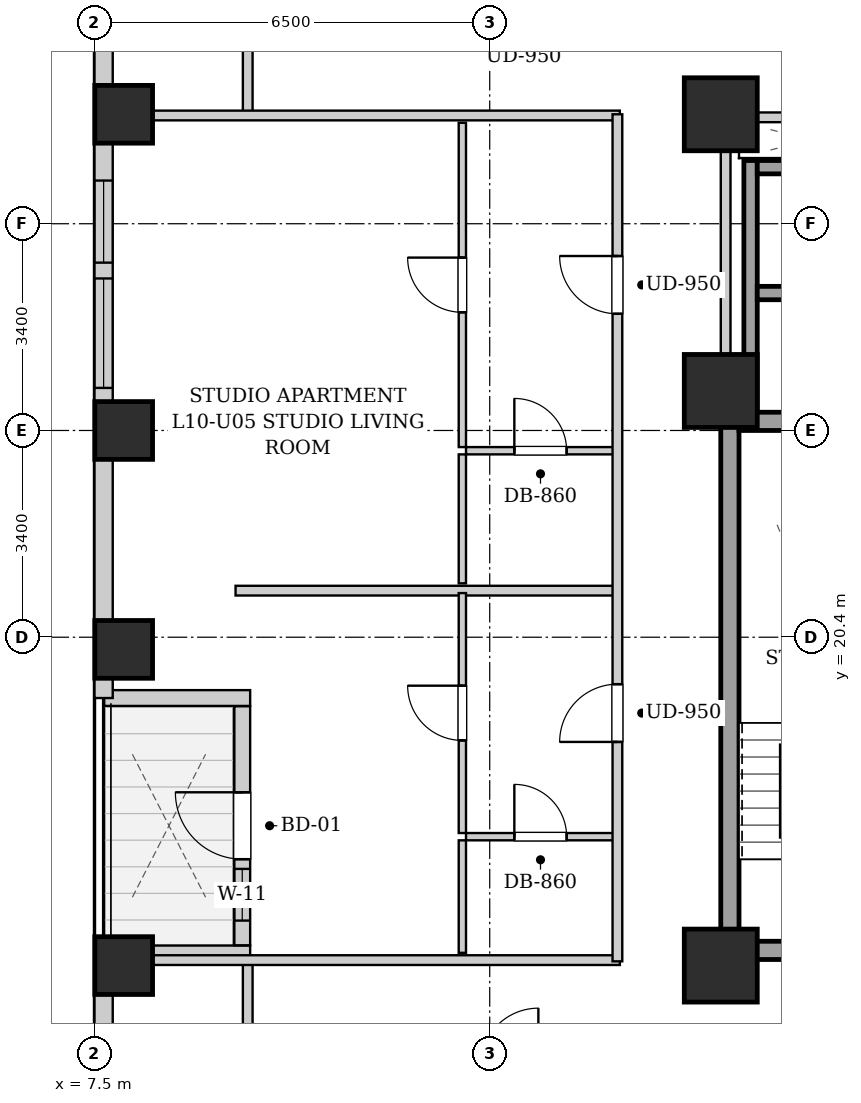
"""IFC4 building model, lengths in metres.
Left out: names, types, materials, properties, quantities, classifications, styles, units other than length and angle.
Written with IfcOpenShell. Run it as: python <this file> out.ifc"""

import sys

from ifc_helpers import new_model, si_unit, direction, frame, frame_2d, origin, origin_2d, place, context, subcontext, project, spatial, rectangle, extrude, element, fill, save


model = new_model("IFC4")
c1 = context("Model", 3, precision=1e-05, world=origin(), true_north=direction((0.0, 1.0)))
c2 = subcontext(c1, "Body", "Model", "MODEL_VIEW")
j1 = project(units=[si_unit("LENGTHUNIT", "METRE"), si_unit("PLANEANGLEUNIT", "RADIAN")], contexts=[c1])
p1 = place(None, origin())
s1 = spatial("IfcSite", under=j1, at=p1, CompositionType="ELEMENT")
p2 = place(p1, origin())
s2 = spatial("IfcBuilding", under=s1, at=p2, CompositionType="ELEMENT")
p3 = place(p2, frame((0.0, 0.0, 41.8)))
s3 = spatial("IfcBuildingStorey", under=s2, at=p3, CompositionType="ELEMENT", Elevation=41.8)
for number, where, z_axis, x_axis in (
    (1, (7.98, 15.0, 0.0), (0.0, 0.0, 1.0), (1.0, 0.0, 0.0)),
    (2, (7.98, 20.2, 0.0), (0.0, 0.0, 1.0), (1.0, 0.0, 0.0)),
    (3, (7.98, 23.8, 0.0), (0.0, 0.0, 1.0), (1.0, 0.0, 0.0)),
    (4, (7.98, 29.0, 0.0), (0.0, 0.0, 1.0), (1.0, 0.0, 0.0)),
):
    element("IfcColumn", number, at=place(p3, frame(where, z_axis=z_axis, x_axis=x_axis)), inside=s3, PredefinedType="COLUMN", context=c2, shape_type="SweptSolid", body=[
        extrude(rectangle(XDim=0.95, YDim=0.95, at=origin_2d()), origin(), (0.0, 0.0, 1.0), 3.2),
    ])
for number, where, z_axis, x_axis in (
    (5, (17.8, 15.0, 0.0), (0.0, 0.0, 1.0), (1.0, 0.0, 0.0)),
    (6, (17.8, 29.0, 0.0), (0.0, 0.0, 1.0), (1.0, 0.0, 0.0)),
    (7, (17.8, 24.45, 0.0), (0.0, 0.0, 1.0), (1.0, 0.0, 0.0)),
):
    element("IfcColumn", number, at=place(p3, frame(where, z_axis=z_axis, x_axis=x_axis)), inside=s3, PredefinedType="COLUMN", context=c2, shape_type="SweptSolid", body=[
        extrude(rectangle(XDim=1.2, YDim=1.2, at=origin_2d()), origin(), (0.0, 0.0, 1.0), 3.2),
    ])
p4 = place(p3, frame((7.65, 2.5, 0.0), z_axis=(0.0, 0.0, 1.0), x_axis=(0.0, 1.0, 0.0)))
e8 = element("IfcWall", 8, at=p4, inside=s3, PredefinedType="SOLIDWALL", context=c2, shape_type="SweptSolid", body=[
    extrude(rectangle(XDim=12.7, YDim=0.3, at=frame_2d((6.35, 0.0))), origin(), (0.0, 0.0, 1.0), 1.975),
])
p5 = place(p4, frame((3.257, 0.0, 0.55)))
e9 = element("IfcOpeningElement", 9, at=p5, cuts=e8, PredefinedType="OPENING", context=c2, shape_type="SweptSolid", body=[
    extrude(rectangle(XDim=1.8, YDim=1.2, at=frame_2d((0.9, 0.6))), frame((0.0, 0.16, 0.0), z_axis=(0.0, -1.0, 0.0), x_axis=(1.0, 0.0, 0.0)), (0.0, 0.0, 1.0), 0.32),
])
p6 = place(p4, frame((1.185, 0.0, 0.55)))
e10 = element("IfcOpeningElement", 10, at=p6, cuts=e8, PredefinedType="OPENING", context=c2, shape_type="SweptSolid", body=[
    extrude(rectangle(XDim=1.35, YDim=1.2, at=frame_2d((0.675, 0.6))), frame((0.0, 0.16, 0.0), z_axis=(0.0, -1.0, 0.0), x_axis=(1.0, 0.0, 0.0)), (0.0, 0.0, 1.0), 0.32),
])
p7 = place(p3, frame((7.66, 15.2, 0.0), z_axis=(0.0, 0.0, 1.0), x_axis=(1.0, 0.0, 0.0)))
e11 = element("IfcWall", 11, at=p7, inside=s3, PredefinedType="SOLIDWALL", context=c2, shape_type="SweptSolid", body=[
    extrude(rectangle(XDim=2.4, YDim=0.26, at=frame_2d((1.2, 0.0))), origin(), (0.0, 0.0, 1.0), 2.94),
])
p8 = place(p3, frame((9.93, 15.334, 0.0), z_axis=(0.0, 0.0, 1.0), x_axis=(0.0, 1.0, 0.0)))
e12 = element("IfcWall", 12, at=p8, inside=s3, PredefinedType="SOLIDWALL", context=c2, shape_type="SweptSolid", body=[
    extrude(rectangle(XDim=3.932, YDim=0.26, at=frame_2d((1.966, 0.0))), origin(), (0.0, 0.0, 1.0), 2.94),
])
p9 = place(p8, frame((1.416, 0.0, 0.0)))
e13 = element("IfcOpeningElement", 13, at=p9, cuts=e12, PredefinedType="OPENING", context=c2, shape_type="SweptSolid", body=[
    extrude(rectangle(XDim=1.1, YDim=2.0, at=frame_2d((0.55, 1.0))), frame((0.0, 0.14, 0.0), z_axis=(0.0, -1.0, 0.0), x_axis=(1.0, 0.0, 0.0)), (0.0, 0.0, 1.0), 0.28),
])
p10 = place(p8, frame((0.406, 0.0, 0.55)))
e14 = element("IfcOpeningElement", 14, at=p10, cuts=e12, PredefinedType="OPENING", context=c2, shape_type="SweptSolid", body=[
    extrude(rectangle(XDim=0.85, YDim=1.2, at=frame_2d((0.425, 0.6))), frame((0.0, 0.14, 0.0), z_axis=(0.0, -1.0, 0.0), x_axis=(1.0, 0.0, 0.0)), (0.0, 0.0, 1.0), 0.28),
])
p11 = place(p3, frame((10.06, 19.4, 0.0), z_axis=(0.0, 0.0, 1.0), x_axis=(-1.0, 0.0, 0.0)))
e15 = element("IfcWall", 15, at=p11, inside=s3, PredefinedType="SOLIDWALL", context=c2, shape_type="SweptSolid", body=[
    extrude(rectangle(XDim=2.4, YDim=0.26, at=frame_2d((1.2, 0.0))), origin(), (0.0, 0.0, 1.0), 2.94),
])
p12 = place(p3, frame((7.65, 19.4, 0.0), z_axis=(0.0, 0.0, 1.0), x_axis=(0.0, 1.0, 0.0)))
e16 = element("IfcWall", 16, at=p12, inside=s3, PredefinedType="SOLIDWALL", context=c2, shape_type="SweptSolid", body=[
    extrude(rectangle(XDim=25.7, YDim=0.3, at=frame_2d((12.85, 0.0))), origin(), (0.0, 0.0, 1.0), 1.975),
])
p13 = place(p12, frame((20.235, 0.0, 0.55)))
e17 = element("IfcOpeningElement", 17, at=p13, cuts=e16, PredefinedType="OPENING", context=c2, shape_type="SweptSolid", body=[
    extrude(rectangle(XDim=1.8, YDim=1.2, at=frame_2d((0.9, 0.6))), frame((0.0, 0.16, 0.0), z_axis=(0.0, -1.0, 0.0), x_axis=(1.0, 0.0, 0.0)), (0.0, 0.0, 1.0), 0.32),
])
p14 = place(p12, frame((14.635, 0.0, 0.55)))
e18 = element("IfcOpeningElement", 18, at=p14, cuts=e16, PredefinedType="OPENING", context=c2, shape_type="SweptSolid", body=[
    extrude(rectangle(XDim=1.35, YDim=1.2, at=frame_2d((0.675, 0.6))), frame((0.0, 0.16, 0.0), z_axis=(0.0, -1.0, 0.0), x_axis=(1.0, 0.0, 0.0)), (0.0, 0.0, 1.0), 0.32),
])
p15 = place(p12, frame((5.1, 0.0, 0.55)))
e19 = element("IfcOpeningElement", 19, at=p15, cuts=e16, PredefinedType="OPENING", context=c2, shape_type="SweptSolid", body=[
    extrude(rectangle(XDim=1.8, YDim=1.2, at=frame_2d((0.9, 0.6))), frame((0.0, 0.16, 0.0), z_axis=(0.0, -1.0, 0.0), x_axis=(1.0, 0.0, 0.0)), (0.0, 0.0, 1.0), 0.32),
])
p16 = place(p12, frame((7.16, 0.0, 0.55)))
e20 = element("IfcOpeningElement", 20, at=p16, cuts=e16, PredefinedType="OPENING", context=c2, shape_type="SweptSolid", body=[
    extrude(rectangle(XDim=1.35, YDim=1.2, at=frame_2d((0.675, 0.6))), frame((0.0, 0.16, 0.0), z_axis=(0.0, -1.0, 0.0), x_axis=(1.0, 0.0, 0.0)), (0.0, 0.0, 1.0), 0.32),
])
p17 = place(p3, frame((17.95, 15.1, 0.0), z_axis=(0.0, 0.0, 1.0), x_axis=(0.0, 1.0, 0.0)))
e21 = element("IfcWall", 21, at=p17, inside=s3, PredefinedType="SHEAR", context=c2, shape_type="SweptSolid", body=[
    extrude(rectangle(XDim=9.0, YDim=0.3, at=frame_2d((4.5, 0.0))), origin(), (0.0, 0.0, 1.0), 2.94),
])
p18 = place(p3, frame((18.1, 23.95, 0.0), z_axis=(0.0, 0.0, 1.0), x_axis=(1.0, 0.0, 0.0)))
e22 = element("IfcWall", 22, at=p18, inside=s3, PredefinedType="SHEAR", context=c2, shape_type="SweptSolid", body=[
    extrude(rectangle(XDim=2.85, YDim=0.3, at=frame_2d((1.425, 0.0))), origin(), (0.0, 0.0, 1.0), 2.94),
])
p19 = place(p3, frame((18.1, 15.25, 0.0), z_axis=(0.0, 0.0, 1.0), x_axis=(1.0, 0.0, 0.0)))
e23 = element("IfcWall", 23, at=p19, inside=s3, PredefinedType="SHEAR", context=c2, shape_type="SweptSolid", body=[
    extrude(rectangle(XDim=2.85, YDim=0.3, at=frame_2d((1.425, 0.0))), origin(), (0.0, 0.0, 1.0), 2.94),
])
p20 = place(p19, frame((0.86, 0.0, 0.0)))
e24 = element("IfcOpeningElement", 24, at=p20, cuts=e23, PredefinedType="OPENING", context=c2, shape_type="SweptSolid", body=[
    extrude(rectangle(XDim=1.1, YDim=2.05, at=frame_2d((0.55, 1.025))), frame((0.0, 0.16, 0.0), z_axis=(0.0, -1.0, 0.0), x_axis=(1.0, 0.0, 0.0)), (0.0, 0.0, 1.0), 0.32),
])
p21 = place(p3, frame((18.29, 24.1, 0.0), z_axis=(0.0, 0.0, 1.0), x_axis=(0.0, 1.0, 0.0)))
e25 = element("IfcWall", 25, at=p21, inside=s3, PredefinedType="SHEAR", context=c2, shape_type="SweptSolid", body=[
    extrude(rectangle(XDim=4.14, YDim=0.22, at=frame_2d((2.07, 0.0))), origin(), (0.0, 0.0, 1.0), 2.94),
])
for number, where, z_axis, x_axis in (
    (26, (18.4, 26.06, 0.0), (0.0, 0.0, 1.0), (1.0, 0.0, 0.0)),
    (27, (18.4, 28.13, 0.0), (0.0, 0.0, 1.0), (1.0, 0.0, 0.0)),
):
    element("IfcWall", number, at=place(p3, frame(where, z_axis=z_axis, x_axis=x_axis)), inside=s3, PredefinedType="SHEAR", context=c2, shape_type="SweptSolid", body=[
        extrude(rectangle(XDim=1.9, YDim=0.22, at=frame_2d((0.95, 0.0))), origin(), (0.0, 0.0, 1.0), 2.94),
    ])
p22 = place(p3, frame((17.88, 24.12, 0.0), z_axis=(0.0, 0.0, 1.0), x_axis=(0.0, 1.0, 0.0)))
e28 = element("IfcWall", 28, at=p22, inside=s3, PredefinedType="PARTITIONING", context=c2, shape_type="SweptSolid", body=[
    extrude(rectangle(XDim=4.76, YDim=0.16, at=frame_2d((2.38, 0.0))), origin(), (0.0, 0.0, 1.0), 2.94),
])
p23 = place(p3, frame((17.96, 28.95, 0.0), z_axis=(0.0, 0.0, 1.0), x_axis=(1.0, 0.0, 0.0)))
e29 = element("IfcWall", 29, at=p23, inside=s3, PredefinedType="PARTITIONING", context=c2, shape_type="SweptSolid", body=[
    extrude(rectangle(XDim=4.29, YDim=0.16, at=frame_2d((2.145, 0.0))), origin(), (0.0, 0.0, 1.0), 2.155),
])
p24 = place(p23, frame((1.57, 0.0, 0.0)))
e30 = element("IfcOpeningElement", 30, at=p24, cuts=e29, PredefinedType="OPENING", context=c2, shape_type="SweptSolid", body=[
    extrude(rectangle(XDim=0.86, YDim=2.05, at=frame_2d((0.43, 1.025))), frame((0.0, 0.09, 0.0), z_axis=(0.0, -1.0, 0.0), x_axis=(1.0, 0.0, 0.0)), (0.0, 0.0, 1.0), 0.18),
])
for number, where, z_axis, x_axis in (
    (31, (10.02, 13.35, 0.0), (0.0, 0.0, 1.0), (0.0, 1.0, 0.0)),
    (32, (10.02, 28.98, 0.0), (0.0, 0.0, 1.0), (0.0, 1.0, 0.0)),
):
    element("IfcWall", number, at=place(p3, frame(where, z_axis=z_axis, x_axis=x_axis)), inside=s3, PredefinedType="PARTITIONING", context=c2, shape_type="SweptSolid", body=[
        extrude(rectangle(XDim=1.74, YDim=0.16, at=frame_2d((0.87, 0.0))), origin(), (0.0, 0.0, 1.0), 2.94),
    ])
for number, where, z_axis, x_axis in (
    (33, (7.78, 15.09, 0.0), (0.0, 0.0, 1.0), (1.0, 0.0, 0.0)),
    (34, (7.78, 28.98, 0.0), (0.0, 0.0, 1.0), (1.0, 0.0, 0.0)),
):
    element("IfcWall", number, at=place(p3, frame(where, z_axis=z_axis, x_axis=x_axis)), inside=s3, PredefinedType="PARTITIONING", context=c2, shape_type="SweptSolid", body=[
        extrude(rectangle(XDim=8.36, YDim=0.16, at=frame_2d((4.18, 0.0))), origin(), (0.0, 0.0, 1.0), 2.155),
    ])
p25 = place(p3, frame((9.82, 21.166, 0.0), z_axis=(0.0, 0.0, 1.0), x_axis=(1.0, 0.0, 0.0)))
e35 = element("IfcWall", 35, at=p25, inside=s3, PredefinedType="PARTITIONING", context=c2, shape_type="SweptSolid", body=[
    extrude(rectangle(XDim=6.24, YDim=0.16, at=frame_2d((3.12, 0.0))), origin(), (0.0, 0.0, 1.0), 2.94),
])
p26 = place(p3, frame((13.61, 17.12, 0.0), z_axis=(0.0, 0.0, 1.0), x_axis=(1.0, 0.0, 0.0)))
e36 = element("IfcWall", 36, at=p26, inside=s3, PredefinedType="PARTITIONING", context=c2, shape_type="SweptSolid", body=[
    extrude(rectangle(XDim=2.45, YDim=0.12, at=frame_2d((1.225, 0.0))), origin(), (0.0, 0.0, 1.0), 2.94),
])
p27 = place(p26, frame((0.795, 0.0, 0.0)))
e37 = element("IfcOpeningElement", 37, at=p27, cuts=e36, PredefinedType="OPENING", context=c2, shape_type="SweptSolid", body=[
    extrude(rectangle(XDim=0.86, YDim=2.05, at=frame_2d((0.43, 1.025))), frame((0.0, 0.07, 0.0), z_axis=(0.0, -1.0, 0.0), x_axis=(1.0, 0.0, 0.0)), (0.0, 0.0, 1.0), 0.14),
])
p28 = place(p3, frame((13.55, 15.21, 0.0), z_axis=(0.0, 0.0, 1.0), x_axis=(0.0, 1.0, 0.0)))
e38 = element("IfcWall", 38, at=p28, inside=s3, PredefinedType="PARTITIONING", context=c2, shape_type="SweptSolid", body=[
    extrude(rectangle(XDim=1.85, YDim=0.12, at=frame_2d((0.925, 0.0))), origin(), (0.0, 0.0, 1.0), 2.94),
])
p29 = place(p3, frame((13.55, 17.18, 0.0), z_axis=(0.0, 0.0, 1.0), x_axis=(0.0, 1.0, 0.0)))
e39 = element("IfcWall", 39, at=p29, inside=s3, PredefinedType="PARTITIONING", context=c2, shape_type="SweptSolid", body=[
    extrude(rectangle(XDim=3.946, YDim=0.12, at=frame_2d((1.973, 0.0))), origin(), (0.0, 0.0, 1.0), 2.94),
])
p30 = place(p29, frame((1.523, 0.0, 0.0)))
e40 = element("IfcOpeningElement", 40, at=p30, cuts=e39, PredefinedType="OPENING", context=c2, shape_type="SweptSolid", body=[
    extrude(rectangle(XDim=0.9, YDim=2.05, at=frame_2d((0.45, 1.025))), frame((0.0, 0.07, 0.0), z_axis=(0.0, -1.0, 0.0), x_axis=(1.0, 0.0, 0.0)), (0.0, 0.0, 1.0), 0.14),
])
p31 = place(p3, frame((13.61, 23.467, 0.0), z_axis=(0.0, 0.0, 1.0), x_axis=(1.0, 0.0, 0.0)))
e41 = element("IfcWall", 41, at=p31, inside=s3, PredefinedType="PARTITIONING", context=c2, shape_type="SweptSolid", body=[
    extrude(rectangle(XDim=2.45, YDim=0.12, at=frame_2d((1.225, 0.0))), origin(), (0.0, 0.0, 1.0), 2.94),
])
p32 = place(p31, frame((0.795, 0.0, 0.0)))
e42 = element("IfcOpeningElement", 42, at=p32, cuts=e41, PredefinedType="OPENING", context=c2, shape_type="SweptSolid", body=[
    extrude(rectangle(XDim=0.86, YDim=2.05, at=frame_2d((0.43, 1.025))), frame((0.0, 0.07, 0.0), z_axis=(0.0, -1.0, 0.0), x_axis=(1.0, 0.0, 0.0)), (0.0, 0.0, 1.0), 0.14),
])
p33 = place(p3, frame((13.55, 21.286, 0.0), z_axis=(0.0, 0.0, 1.0), x_axis=(0.0, 1.0, 0.0)))
e43 = element("IfcWall", 43, at=p33, inside=s3, PredefinedType="PARTITIONING", context=c2, shape_type="SweptSolid", body=[
    extrude(rectangle(XDim=2.121, YDim=0.12, at=frame_2d((1.061, 0.0))), origin(), (0.0, 0.0, 1.0), 2.94),
])
p34 = place(p3, frame((13.55, 23.527, 0.0), z_axis=(0.0, 0.0, 1.0), x_axis=(0.0, 1.0, 0.0)))
e44 = element("IfcWall", 44, at=p34, inside=s3, PredefinedType="PARTITIONING", context=c2, shape_type="SweptSolid", body=[
    extrude(rectangle(XDim=5.333, YDim=0.12, at=frame_2d((2.667, 0.0))), origin(), (0.0, 0.0, 1.0), 2.94),
])
p35 = place(p34, frame((2.216, 0.0, 0.0)))
e45 = element("IfcOpeningElement", 45, at=p35, cuts=e44, PredefinedType="OPENING", context=c2, shape_type="SweptSolid", body=[
    extrude(rectangle(XDim=0.9, YDim=2.05, at=frame_2d((0.45, 1.025))), frame((0.0, 0.07, 0.0), z_axis=(0.0, -1.0, 0.0), x_axis=(1.0, 0.0, 0.0)), (0.0, 0.0, 1.0), 0.14),
])
p36 = place(p3, frame((16.1, 15.07, 0.0), z_axis=(0.0, 0.0, 1.0), x_axis=(0.0, 1.0, 0.0)))
e46 = element("IfcWall", 46, at=p36, inside=s3, PredefinedType="PARTITIONING", context=c2, shape_type="SweptSolid", body=[
    extrude(rectangle(XDim=13.93, YDim=0.16, at=frame_2d((6.965, 0.0))), origin(), (0.0, 0.0, 1.0), 2.94),
])
p37 = place(p36, frame((3.608, 0.0, 0.0)))
e47 = element("IfcOpeningElement", 47, at=p37, cuts=e46, PredefinedType="OPENING", context=c2, shape_type="SweptSolid", body=[
    extrude(rectangle(XDim=0.95, YDim=2.1, at=frame_2d((0.475, 1.05))), frame((0.0, 0.09, 0.0), z_axis=(0.0, -1.0, 0.0), x_axis=(1.0, 0.0, 0.0)), (0.0, 0.0, 1.0), 0.18),
])
p38 = place(p36, frame((10.649, 0.0, 0.0)))
e48 = element("IfcOpeningElement", 48, at=p38, cuts=e46, PredefinedType="OPENING", context=c2, shape_type="SweptSolid", body=[
    extrude(rectangle(XDim=0.95, YDim=2.1, at=frame_2d((0.475, 1.05))), frame((0.0, 0.09, 0.0), z_axis=(0.0, -1.0, 0.0), x_axis=(1.0, 0.0, 0.0)), (0.0, 0.0, 1.0), 0.18),
])
p39 = place(p27, origin())
e49 = element("IfcDoor", 49, at=p39, inside=s3, OperationType="SINGLE_SWING_LEFT", PredefinedType="DOOR", context=c2, shape_type="SweptSolid", body=[
    extrude(rectangle(XDim=0.86, YDim=2.05, at=frame_2d((0.43, 1.025))), frame((0.0, 0.025, 0.0), z_axis=(0.0, -1.0, 0.0), x_axis=(1.0, 0.0, 0.0)), (0.0, 0.0, 1.0), 0.05),
])
fill(e37, e49)
p40 = place(p30, origin())
e50 = element("IfcDoor", 50, at=p40, inside=s3, OperationType="SINGLE_SWING_RIGHT", PredefinedType="DOOR", context=c2, shape_type="SweptSolid", body=[
    extrude(rectangle(XDim=0.9, YDim=2.05, at=frame_2d((0.45, 1.025))), frame((0.0, 0.025, 0.0), z_axis=(0.0, -1.0, 0.0), x_axis=(1.0, 0.0, 0.0)), (0.0, 0.0, 1.0), 0.05),
])
fill(e40, e50)
p41 = place(p32, origin())
e51 = element("IfcDoor", 51, at=p41, inside=s3, OperationType="SINGLE_SWING_LEFT", PredefinedType="DOOR", context=c2, shape_type="SweptSolid", body=[
    extrude(rectangle(XDim=0.86, YDim=2.05, at=frame_2d((0.43, 1.025))), frame((0.0, 0.025, 0.0), z_axis=(0.0, -1.0, 0.0), x_axis=(1.0, 0.0, 0.0)), (0.0, 0.0, 1.0), 0.05),
])
fill(e42, e51)
p42 = place(p35, origin())
e52 = element("IfcDoor", 52, at=p42, inside=s3, OperationType="SINGLE_SWING_RIGHT", PredefinedType="DOOR", context=c2, shape_type="SweptSolid", body=[
    extrude(rectangle(XDim=0.9, YDim=2.05, at=frame_2d((0.45, 1.025))), frame((0.0, 0.025, 0.0), z_axis=(0.0, -1.0, 0.0), x_axis=(1.0, 0.0, 0.0)), (0.0, 0.0, 1.0), 0.05),
])
fill(e45, e52)
p43 = place(p37, origin())
e53 = element("IfcDoor", 53, at=p43, inside=s3, OperationType="SINGLE_SWING_LEFT", PredefinedType="DOOR", context=c2, shape_type="SweptSolid", body=[
    extrude(rectangle(XDim=0.95, YDim=2.1, at=frame_2d((0.475, 1.05))), frame((0.0, 0.025, 0.0), z_axis=(0.0, -1.0, 0.0), x_axis=(1.0, 0.0, 0.0)), (0.0, 0.0, 1.0), 0.05),
])
fill(e47, e53)
p44 = place(p38, origin())
e54 = element("IfcDoor", 54, at=p44, inside=s3, OperationType="SINGLE_SWING_RIGHT", PredefinedType="DOOR", context=c2, shape_type="SweptSolid", body=[
    extrude(rectangle(XDim=0.95, YDim=2.1, at=frame_2d((0.475, 1.05))), frame((0.0, 0.025, 0.0), z_axis=(0.0, -1.0, 0.0), x_axis=(1.0, 0.0, 0.0)), (0.0, 0.0, 1.0), 0.05),
])
fill(e48, e54)
p45 = place(p9, origin())
e55 = element("IfcDoor", 55, at=p45, inside=s3, OperationType="SINGLE_SWING_RIGHT", PredefinedType="DOOR", context=c2, shape_type="SweptSolid", body=[
    extrude(rectangle(XDim=1.1, YDim=2.0, at=frame_2d((0.55, 1.0))), frame((0.0, 0.025, 0.0), z_axis=(0.0, -1.0, 0.0), x_axis=(1.0, 0.0, 0.0)), (0.0, 0.0, 1.0), 0.05),
])
fill(e13, e55)
p46 = place(p10, origin())
e56 = element("IfcWindow", 56, at=p46, inside=s3, PartitioningType="SINGLE_PANEL", PredefinedType="WINDOW", context=c2, shape_type="SweptSolid", body=[
    extrude(rectangle(XDim=0.85, YDim=1.2, at=frame_2d((0.425, 0.6))), frame((0.0, 0.03, 0.0), z_axis=(0.0, -1.0, 0.0), x_axis=(1.0, 0.0, 0.0)), (0.0, 0.0, 1.0), 0.06),
])
fill(e14, e56)
p47 = place(p15, origin())
e57 = element("IfcWindow", 57, at=p47, inside=s3, PartitioningType="DOUBLE_PANEL_VERTICAL", PredefinedType="WINDOW", context=c2, shape_type="SweptSolid", body=[
    extrude(rectangle(XDim=1.8, YDim=1.2, at=frame_2d((0.9, 0.6))), frame((0.0, 0.03, 0.0), z_axis=(0.0, -1.0, 0.0), x_axis=(1.0, 0.0, 0.0)), (0.0, 0.0, 1.0), 0.06),
])
fill(e19, e57)
p48 = place(p16, origin())
e58 = element("IfcWindow", 58, at=p48, inside=s3, PartitioningType="SINGLE_PANEL", PredefinedType="WINDOW", context=c2, shape_type="SweptSolid", body=[
    extrude(rectangle(XDim=1.35, YDim=1.2, at=frame_2d((0.675, 0.6))), frame((0.0, 0.03, 0.0), z_axis=(0.0, -1.0, 0.0), x_axis=(1.0, 0.0, 0.0)), (0.0, 0.0, 1.0), 0.06),
])
fill(e20, e58)
save(model, sys.argv[1])
